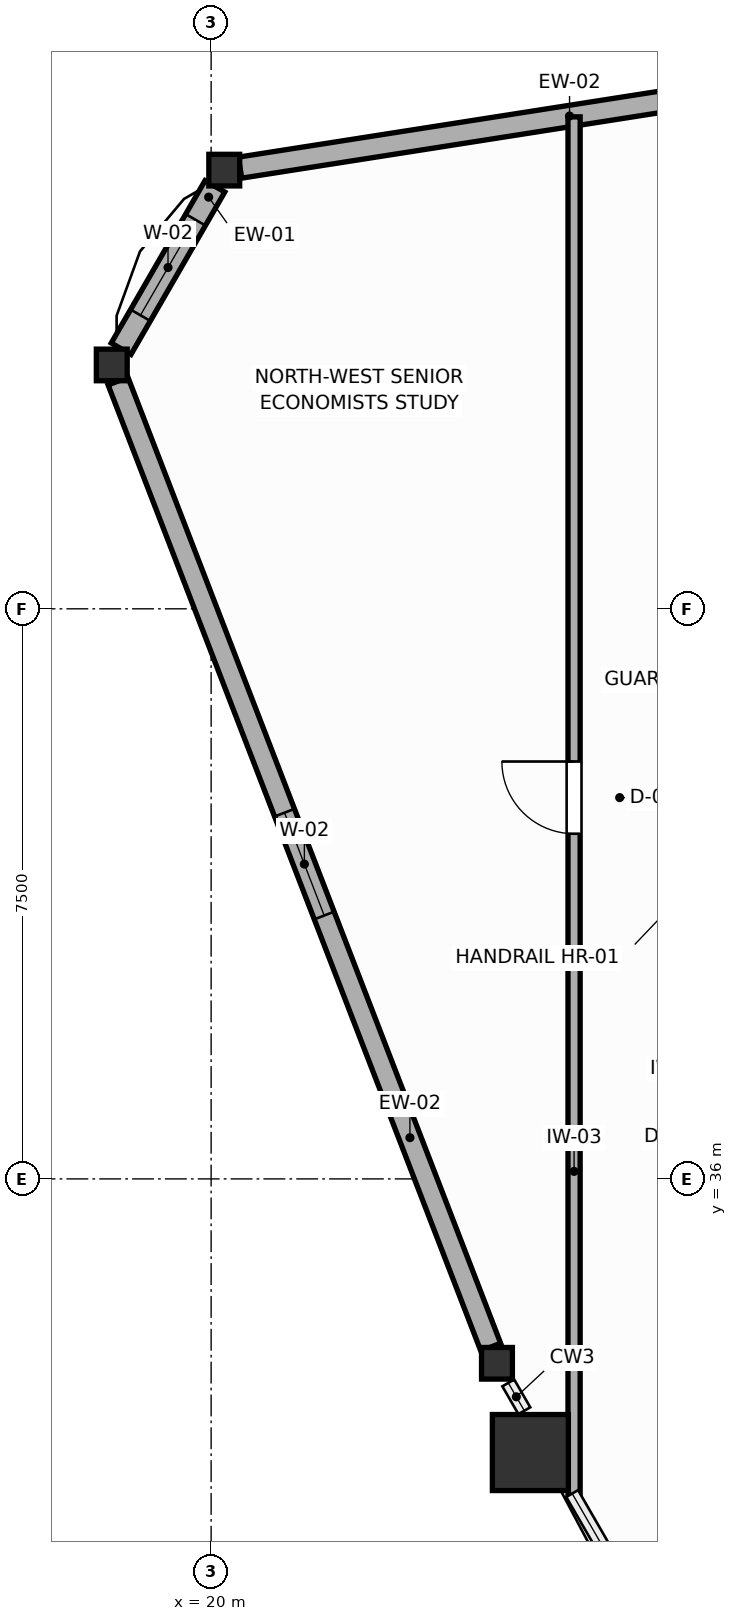
"""IFC4 building model, lengths in metres.
Left out: names, types, materials, properties, quantities, classifications, styles, units other than length and angle.
Written with IfcOpenShell. Run it as: python <this file> out.ifc"""

import sys

from ifc_helpers import new_model, si_unit, direction, frame, frame_2d, origin, origin_2d, place, context, subcontext, project, spatial, rectangle, i_section, extrude, source, transform, mapped, element, fill, save


model = new_model("IFC4")
c1 = context("Model", 3, precision=1e-05, world=origin(), true_north=direction((0.0, 1.0)))
c2 = subcontext(c1, "Body", "Model", "MODEL_VIEW")
j1 = project(units=[si_unit("LENGTHUNIT", "METRE"), si_unit("PLANEANGLEUNIT", "RADIAN")], contexts=[c1])
p1 = place(None, origin())
s1 = spatial("IfcSite", under=j1, at=p1, CompositionType="ELEMENT")
p2 = place(p1, origin())
s2 = spatial("IfcBuilding", under=s1, at=p2, CompositionType="ELEMENT")
p3 = place(p2, frame((0.0, 0.0, 220.2)))
s3 = spatial("IfcBuildingStorey", under=s2, at=p3, CompositionType="ELEMENT", Elevation=220.2)
m1 = source(origin(), c2, "Body", "SweptSolid", [
    extrude(rectangle(XDim=1.0, YDim=1.0, at=origin_2d()), origin(), (0.0, 0.0, 1.0), 3.6),
])
p4 = place(p3, frame((24.2, 32.4, 0.0), z_axis=(0.0, 0.0, 1.0), x_axis=(1.0, 0.0, 0.0)))
e1 = element("IfcColumn", 1, at=p4, inside=s3, PredefinedType="COLUMN", context=c2, shape_type="MappedRepresentation", body=[
    mapped(m1, transform((0.0, 0.0, 0.0), scale=1.0)),
])
m2 = source(origin(), c2, "Body", "SweptSolid", [
    extrude(i_section(OverallWidth=0.406, OverallDepth=0.416, WebThickness=0.027, FlangeThickness=0.044, FilletRadius=0.015, at=origin_2d()), origin(), (0.0, 0.0, 1.0), 3.6),
])
for number, where, z_axis, x_axis in (
    (2, (20.173, 49.271, 0.0), (0.0, 0.0, 1.0), (1.0, 0.0, 0.0)),
    (3, (18.693, 46.708, 0.0), (0.0, 0.0, 1.0), (1.0, 0.0, 0.0)),
    (4, (23.76, 33.574, 0.0), (0.0, 0.0, 1.0), (1.0, 0.0, 0.0)),
):
    element("IfcColumn", number, at=place(p3, frame(where, z_axis=z_axis, x_axis=x_axis)), inside=s3, PredefinedType="COLUMN", context=c2, shape_type="MappedRepresentation", body=[
        mapped(m2, transform((0.0, 0.0, 0.0), scale=1.0)),
    ])
p5 = place(p3, frame((33.873, 51.417, 0.0), z_axis=(0.0, 0.0, 1.0), x_axis=(-0.987957437721, -0.154725890697, 0.0)))
e5 = element("IfcWall", 5, at=p5, inside=s3, PredefinedType="SOLIDWALL", context=c2, shape_type="SweptSolid", body=[
    extrude(rectangle(XDim=13.657, YDim=0.28, at=frame_2d((6.828, 0.0))), origin(), (0.0, 0.0, 1.0), 2.96),
])
p6 = place(p5, frame((3.252, 0.0, 0.75)))
e6 = element("IfcOpeningElement", 6, at=p6, cuts=e5, PredefinedType="OPENING", context=c2, shape_type="SweptSolid", body=[
    extrude(rectangle(XDim=1.45, YDim=1.65, at=frame_2d((0.725, 0.825))), frame((0.0, 0.15, 0.0), z_axis=(0.0, -1.0, 0.0), x_axis=(1.0, 0.0, 0.0)), (0.0, 0.0, 1.0), 0.3),
])
p7 = place(p3, frame((20.05, 49.059, 0.0), z_axis=(0.0, 0.0, 1.0), x_axis=(-0.499990780478, -0.866030726613, 0.0)))
e7 = element("IfcWall", 7, at=p7, inside=s3, PredefinedType="SOLIDWALL", context=c2, shape_type="SweptSolid", body=[
    extrude(rectangle(XDim=2.468, YDim=0.3, at=frame_2d((1.234, 0.0))), origin(), (0.0, 0.0, 1.0), 3.02),
])
p8 = place(p7, frame((0.509, 0.0, 0.75)))
e8 = element("IfcOpeningElement", 8, at=p8, cuts=e7, PredefinedType="OPENING", context=c2, shape_type="SweptSolid", body=[
    extrude(rectangle(XDim=1.45, YDim=1.65, at=frame_2d((0.725, 0.825))), frame((0.0, 0.16, 0.0), z_axis=(0.0, -1.0, 0.0), x_axis=(1.0, 0.0, 0.0)), (0.0, 0.0, 1.0), 0.32),
])
p9 = place(p3, frame((18.775, 46.495, 0.0), z_axis=(0.0, 0.0, 1.0), x_axis=(0.359956541612, -0.93296907138, 0.0)))
e9 = element("IfcWall", 9, at=p9, inside=s3, PredefinedType="SOLIDWALL", context=c2, shape_type="SweptSolid", body=[
    extrude(rectangle(XDim=13.621, YDim=0.28, at=frame_2d((6.811, 0.0))), origin(), (0.0, 0.0, 1.0), 3.02),
])
p10 = place(p9, frame((6.086, 0.0, 0.75)))
e10 = element("IfcOpeningElement", 10, at=p10, cuts=e9, PredefinedType="OPENING", context=c2, shape_type="SweptSolid", body=[
    extrude(rectangle(XDim=1.45, YDim=1.65, at=frame_2d((0.725, 0.825))), frame((0.0, 0.15, 0.0), z_axis=(0.0, -1.0, 0.0), x_axis=(1.0, 0.0, 0.0)), (0.0, 0.0, 1.0), 0.3),
])
p11 = place(p3, frame((24.775, 31.837, 0.0), z_axis=(0.0, 0.0, 1.0), x_axis=(0.0, 1.0, 0.0)))
e11 = element("IfcWall", 11, at=p11, inside=s3, PredefinedType="PARTITIONING", context=c2, shape_type="SweptSolid", body=[
    extrude(rectangle(XDim=18.135, YDim=0.16, at=frame_2d((9.068, 0.0))), origin(), (0.0, 0.0, 1.0), 3.41),
])
p12 = place(p11, frame((8.704, 0.0, 0.0)))
e12 = element("IfcOpeningElement", 12, at=p12, cuts=e11, PredefinedType="OPENING", context=c2, shape_type="SweptSolid", body=[
    extrude(rectangle(XDim=0.95, YDim=2.05, at=frame_2d((0.475, 1.025))), frame((0.0, 0.09, 0.0), z_axis=(0.0, -1.0, 0.0), x_axis=(1.0, 0.0, 0.0)), (0.0, 0.0, 1.0), 0.18),
])
p13 = place(p8, origin())
e13 = element("IfcWindow", 13, at=p13, inside=s3, PartitioningType="SINGLE_PANEL", PredefinedType="WINDOW", context=c2, shape_type="SweptSolid", body=[
    extrude(rectangle(XDim=1.45, YDim=1.65, at=frame_2d((0.725, 0.825))), frame((0.0, 0.03, 0.0), z_axis=(0.0, -1.0, 0.0), x_axis=(1.0, 0.0, 0.0)), (0.0, 0.0, 1.0), 0.06),
])
fill(e8, e13)
p14 = place(p10, origin())
e14 = element("IfcWindow", 14, at=p14, inside=s3, PartitioningType="SINGLE_PANEL", PredefinedType="WINDOW", context=c2, shape_type="SweptSolid", body=[
    extrude(rectangle(XDim=1.45, YDim=1.65, at=frame_2d((0.725, 0.825))), frame((0.0, 0.03, 0.0), z_axis=(0.0, -1.0, 0.0), x_axis=(1.0, 0.0, 0.0)), (0.0, 0.0, 1.0), 0.06),
])
fill(e10, e14)
p15 = place(p12, origin())
e15 = element("IfcDoor", 15, at=p15, inside=s3, OperationType="SINGLE_SWING_RIGHT", PredefinedType="DOOR", context=c2, shape_type="SweptSolid", body=[
    extrude(rectangle(XDim=0.95, YDim=2.05, at=frame_2d((0.475, 1.025))), frame((0.0, 0.025, 0.0), z_axis=(0.0, -1.0, 0.0), x_axis=(1.0, 0.0, 0.0)), (0.0, 0.0, 1.0), 0.05),
])
fill(e12, e15)
save(model, sys.argv[1])
